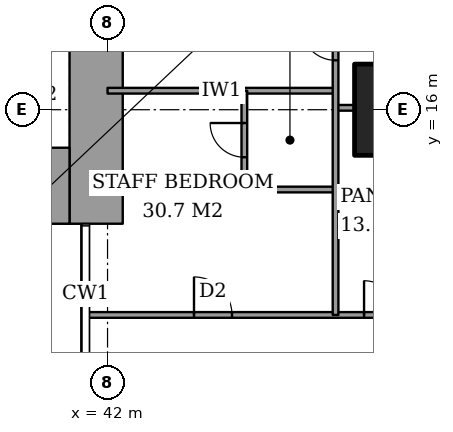
"""IFC4 building model, lengths in metres.
Left out: names, types, materials, properties, quantities, classifications, styles, units other than length and angle.
Written with IfcOpenShell. Run it as: python <this file> out.ifc"""

import sys

from ifc_helpers import new_model, si_unit, direction, frame, frame_2d, origin, origin_2d, place, context, subcontext, project, spatial, rectangle, extrude, element, fill, save


model = new_model("IFC4")
c1 = context("Model", 3, precision=1e-05, world=origin(), true_north=direction((0.0, 1.0)))
c2 = subcontext(c1, "Body", "Model", "MODEL_VIEW")
j1 = project(units=[si_unit("LENGTHUNIT", "METRE"), si_unit("PLANEANGLEUNIT", "RADIAN")], contexts=[c1])
p1 = place(None, origin())
s1 = spatial("IfcSite", under=j1, at=p1, CompositionType="ELEMENT")
p2 = place(p1, origin())
s2 = spatial("IfcBuilding", under=s1, at=p2, CompositionType="ELEMENT")
p3 = place(p2, frame((0.0, 0.0, 241.2)))
s3 = spatial("IfcBuildingStorey", under=s2, at=p3, CompositionType="ELEMENT", Elevation=241.2)
p4 = place(p3, frame((50.0, 16.0, 0.0), z_axis=(0.0, 0.0, 1.0), x_axis=(1.0, 0.0, 0.0)))
e1 = element("IfcColumn", 1, at=p4, inside=s3, PredefinedType="COLUMN", context=c2, shape_type="SweptSolid", body=[
    extrude(rectangle(XDim=3.0, YDim=2.4, at=origin_2d()), origin(), (0.0, 0.0, 1.0), 3.6),
])
p5 = place(p3, frame((37.85, 14.0, 0.0), z_axis=(0.0, 0.0, 1.0), x_axis=(1.0, 0.0, 0.0)))
e2 = element("IfcWall", 2, at=p5, inside=s3, PredefinedType="SHEAR", context=c2, shape_type="SweptSolid", body=[
    extrude(rectangle(XDim=3.15, YDim=2.0, at=frame_2d((1.575, 0.0))), origin(), (0.0, 0.0, 1.0), 3.6),
])
p6 = place(p3, frame((41.7, 13.0, 0.0), z_axis=(0.0, 0.0, 1.0), x_axis=(0.0, 1.0, 0.0)))
e3 = element("IfcWall", 3, at=p6, inside=s3, PredefinedType="SHEAR", context=c2, shape_type="SweptSolid", body=[
    extrude(rectangle(XDim=11.85, YDim=1.4, at=frame_2d((5.925, 0.0))), origin(), (0.0, 0.0, 1.0), 3.6),
])
p7 = place(p6, frame((7.5, 0.0, 0.0)))
e4 = element("IfcOpeningElement", 4, at=p7, cuts=e3, PredefinedType="OPENING", context=c2, shape_type="SweptSolid", body=[
    extrude(rectangle(XDim=1.8, YDim=2.4, at=frame_2d((0.9, 1.2))), frame((0.0, 0.71, 0.0), z_axis=(0.0, -1.0, 0.0), x_axis=(1.0, 0.0, 0.0)), (0.0, 0.0, 1.0), 1.42),
])
p8 = place(p3, frame((41.439, 10.6, 0.0), z_axis=(0.0, 0.0, 1.0), x_axis=(1.0, 0.0, 0.0)))
e5 = element("IfcWall", 5, at=p8, inside=s3, PredefinedType="PARTITIONING", context=c2, shape_type="SweptSolid", body=[
    extrude(rectangle(XDim=25.011, YDim=0.15, at=frame_2d((12.505, 0.0))), origin(), (0.0, 0.0, 1.0), 3.35),
])
p9 = place(p8, frame((11.961, 0.0, 0.0)))
e6 = element("IfcOpeningElement", 6, at=p9, cuts=e5, PredefinedType="OPENING", context=c2, shape_type="SweptSolid", body=[
    extrude(rectangle(XDim=1.0, YDim=2.1, at=frame_2d((0.5, 1.05))), frame((0.0, 0.085, 0.0), z_axis=(0.0, -1.0, 0.0), x_axis=(1.0, 0.0, 0.0)), (0.0, 0.0, 1.0), 0.17),
])
p10 = place(p8, frame((20.924, 0.0, 0.0)))
e7 = element("IfcOpeningElement", 7, at=p10, cuts=e5, PredefinedType="OPENING", context=c2, shape_type="SweptSolid", body=[
    extrude(rectangle(XDim=1.0, YDim=2.1, at=frame_2d((0.5, 1.05))), frame((0.0, 0.085, 0.0), z_axis=(0.0, -1.0, 0.0), x_axis=(1.0, 0.0, 0.0)), (0.0, 0.0, 1.0), 0.17),
])
p11 = place(p8, frame((15.249, 0.0, 0.0)))
e8 = element("IfcOpeningElement", 8, at=p11, cuts=e5, PredefinedType="OPENING", context=c2, shape_type="SweptSolid", body=[
    extrude(rectangle(XDim=0.9, YDim=2.1, at=frame_2d((0.45, 1.05))), frame((0.0, 0.085, 0.0), z_axis=(0.0, -1.0, 0.0), x_axis=(1.0, 0.0, 0.0)), (0.0, 0.0, 1.0), 0.17),
])
p12 = place(p8, frame((9.661, 0.0, 0.0)))
e9 = element("IfcOpeningElement", 9, at=p12, cuts=e5, PredefinedType="OPENING", context=c2, shape_type="SweptSolid", body=[
    extrude(rectangle(XDim=1.0, YDim=2.1, at=frame_2d((0.5, 1.05))), frame((0.0, 0.085, 0.0), z_axis=(0.0, -1.0, 0.0), x_axis=(1.0, 0.0, 0.0)), (0.0, 0.0, 1.0), 0.17),
])
p13 = place(p8, frame((7.311, 0.0, 0.0)))
e10 = element("IfcOpeningElement", 10, at=p13, cuts=e5, PredefinedType="OPENING", context=c2, shape_type="SweptSolid", body=[
    extrude(rectangle(XDim=0.9, YDim=2.1, at=frame_2d((0.45, 1.05))), frame((0.0, 0.085, 0.0), z_axis=(0.0, -1.0, 0.0), x_axis=(1.0, 0.0, 0.0)), (0.0, 0.0, 1.0), 0.17),
])
p14 = place(p8, frame((2.836, 0.0, 0.0)))
e11 = element("IfcOpeningElement", 11, at=p14, cuts=e5, PredefinedType="OPENING", context=c2, shape_type="SweptSolid", body=[
    extrude(rectangle(XDim=1.0, YDim=2.1, at=frame_2d((0.5, 1.05))), frame((0.0, 0.085, 0.0), z_axis=(0.0, -1.0, 0.0), x_axis=(1.0, 0.0, 0.0)), (0.0, 0.0, 1.0), 0.17),
])
p15 = place(p3, frame((45.6, 13.9, 0.0), z_axis=(0.0, 0.0, 1.0), x_axis=(1.0, 0.0, 0.0)))
e12 = element("IfcWall", 12, at=p15, inside=s3, PredefinedType="PARTITIONING", context=c2, shape_type="SweptSolid", body=[
    extrude(rectangle(XDim=2.4, YDim=0.15, at=frame_2d((1.2, 0.0))), origin(), (0.0, 0.0, 1.0), 3.35),
])
p16 = place(p3, frame((48.0, 16.05, 0.0), z_axis=(0.0, 0.0, 1.0), x_axis=(1.0, 0.0, 0.0)))
e13 = element("IfcWall", 13, at=p16, inside=s3, PredefinedType="PARTITIONING", context=c2, shape_type="SweptSolid", body=[
    extrude(rectangle(XDim=0.5, YDim=0.15, at=frame_2d((0.25, 0.0))), origin(), (0.0, 0.0, 1.0), 2.634),
])
p17 = place(p3, frame((42.0, 16.5, 0.0), z_axis=(0.0, 0.0, 1.0), x_axis=(1.0, 0.0, 0.0)))
e14 = element("IfcWall", 14, at=p17, inside=s3, PredefinedType="PARTITIONING", context=c2, shape_type="SweptSolid", body=[
    extrude(rectangle(XDim=6.0, YDim=0.15, at=frame_2d((3.0, 0.0))), origin(), (0.0, 0.0, 1.0), 3.35),
])
p18 = place(p3, frame((45.6, 13.9, 0.0), z_axis=(0.0, 0.0, 1.0), x_axis=(0.0, 1.0, 0.0)))
e15 = element("IfcWall", 15, at=p18, inside=s3, PredefinedType="PARTITIONING", context=c2, shape_type="SweptSolid", body=[
    extrude(rectangle(XDim=2.6, YDim=0.15, at=frame_2d((1.3, 0.0))), origin(), (0.0, 0.0, 1.0), 3.35),
])
p19 = place(p18, frame((0.85, 0.0, 0.0)))
e16 = element("IfcOpeningElement", 16, at=p19, cuts=e15, PredefinedType="OPENING", context=c2, shape_type="SweptSolid", body=[
    extrude(rectangle(XDim=0.9, YDim=2.1, at=frame_2d((0.45, 1.05))), frame((0.0, 0.085, 0.0), z_axis=(0.0, -1.0, 0.0), x_axis=(1.0, 0.0, 0.0)), (0.0, 0.0, 1.0), 0.17),
])
p20 = place(p3, frame((48.0, 10.6, 0.0), z_axis=(0.0, 0.0, 1.0), x_axis=(0.0, 1.0, 0.0)))
e17 = element("IfcWall", 17, at=p20, inside=s3, PredefinedType="PARTITIONING", context=c2, shape_type="SweptSolid", body=[
    extrude(rectangle(XDim=8.4, YDim=0.15, at=frame_2d((4.2, 0.0))), origin(), (0.0, 0.0, 1.0), 3.35),
])
p21 = place(p20, frame((6.7, 0.0, 0.0)))
e18 = element("IfcOpeningElement", 18, at=p21, cuts=e17, PredefinedType="OPENING", context=c2, shape_type="SweptSolid", body=[
    extrude(rectangle(XDim=0.9, YDim=2.1, at=frame_2d((0.45, 1.05))), frame((0.0, 0.085, 0.0), z_axis=(0.0, -1.0, 0.0), x_axis=(1.0, 0.0, 0.0)), (0.0, 0.0, 1.0), 0.17),
])
p22 = place(p13, origin())
e19 = element("IfcDoor", 19, at=p22, inside=s3, OperationType="SINGLE_SWING_RIGHT", PredefinedType="DOOR", context=c2, shape_type="SweptSolid", body=[
    extrude(rectangle(XDim=0.9, YDim=2.1, at=frame_2d((0.45, 1.05))), frame((0.0, 0.025, 0.0), z_axis=(0.0, -1.0, 0.0), x_axis=(1.0, 0.0, 0.0)), (0.0, 0.0, 1.0), 0.05),
])
fill(e10, e19)
p23 = place(p19, origin())
e20 = element("IfcDoor", 20, at=p23, inside=s3, OperationType="SINGLE_SWING_LEFT", PredefinedType="DOOR", context=c2, shape_type="SweptSolid", body=[
    extrude(rectangle(XDim=0.9, YDim=2.1, at=frame_2d((0.45, 1.05))), frame((0.0, 0.025, 0.0), z_axis=(0.0, -1.0, 0.0), x_axis=(1.0, 0.0, 0.0)), (0.0, 0.0, 1.0), 0.05),
])
fill(e16, e20)
p24 = place(p14, origin())
e21 = element("IfcDoor", 21, at=p24, inside=s3, OperationType="SINGLE_SWING_RIGHT", PredefinedType="DOOR", context=c2, shape_type="SweptSolid", body=[
    extrude(rectangle(XDim=1.0, YDim=2.1, at=frame_2d((0.5, 1.05))), frame((0.0, 0.025, 0.0), z_axis=(0.0, -1.0, 0.0), x_axis=(1.0, 0.0, 0.0)), (0.0, 0.0, 1.0), 0.05),
])
fill(e11, e21)
p25 = place(p21, origin())
e22 = element("IfcDoor", 22, at=p25, inside=s3, OperationType="SINGLE_SWING_LEFT", PredefinedType="DOOR", context=c2, shape_type="SweptSolid", body=[
    extrude(rectangle(XDim=0.9, YDim=2.1, at=frame_2d((0.45, 1.05))), frame((0.0, 0.025, 0.0), z_axis=(0.0, -1.0, 0.0), x_axis=(1.0, 0.0, 0.0)), (0.0, 0.0, 1.0), 0.05),
])
fill(e18, e22)
save(model, sys.argv[1])
